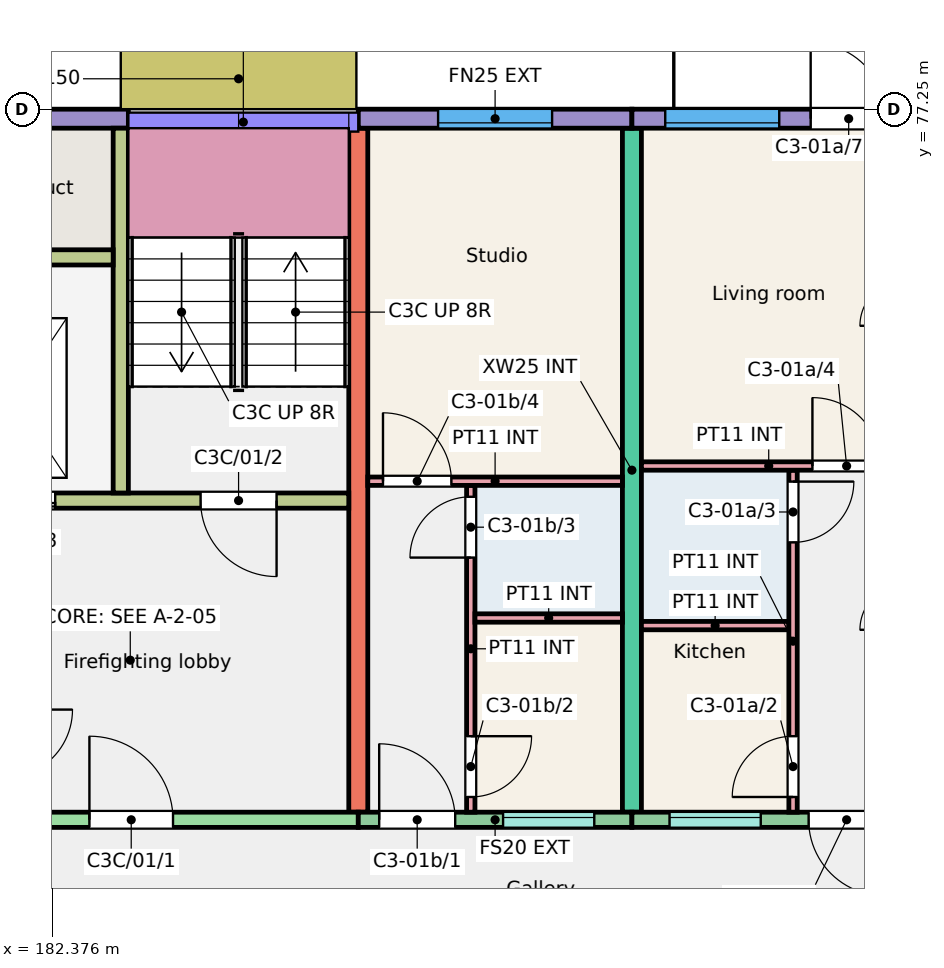
"""IFC4 building model, lengths in metres.
Left out: names, types, materials, properties, quantities, classifications, styles, units other than length and angle.
Written with IfcOpenShell. Run it as: python <this file> out.ifc"""

import sys

from ifc_helpers import new_model, si_unit, direction, frame, frame_2d, origin, place, context, subcontext, project, spatial, rectangle, extrude, element, fill, save


model = new_model("IFC4")
c1 = context("Model", 3, precision=1e-05, world=origin(), true_north=direction((0.0, 1.0)))
c2 = subcontext(c1, "Body", "Model", "MODEL_VIEW")
j1 = project(units=[si_unit("LENGTHUNIT", "METRE"), si_unit("PLANEANGLEUNIT", "RADIAN")], contexts=[c1])
p1 = place(None, origin())
s1 = spatial("IfcSite", under=j1, at=p1, CompositionType="ELEMENT")
p2 = place(p1, origin())
s2 = spatial("IfcBuilding", under=s1, at=p2, CompositionType="ELEMENT")
p3 = place(p2, frame((0.0, 0.0, 3.0)))
s3 = spatial("IfcBuildingStorey", under=s2, at=p3, CompositionType="ELEMENT", Elevation=3.0)
for number, where, z_axis, x_axis in (
    (1, (186.4, 68.0, 0.0), (0.0, 0.0, 1.0), (0.0, 1.0, 0.0)),
    (2, (190.0, 68.0, 0.0), (0.0, 0.0, 1.0), (0.0, 1.0, 0.0)),
):
    element("IfcWall", number, at=place(p3, frame(where, z_axis=z_axis, x_axis=x_axis)), inside=s3, PredefinedType="SHEAR", context=c2, shape_type="SweptSolid", body=[
        extrude(rectangle(XDim=9.0, YDim=0.25, at=frame_2d((4.5, 0.0))), origin(), (0.0, 0.0, 1.0), 3.0),
    ])
p4 = place(p3, frame((180.4, 77.125, 0.0), z_axis=(0.0, 0.0, 1.0), x_axis=(1.0, 0.0, 0.0)))
e3 = element("IfcWall", 3, at=p4, inside=s3, PredefinedType="SOLIDWALL", context=c2, shape_type="SweptSolid", body=[
    extrude(rectangle(XDim=2.975, YDim=0.25, at=frame_2d((1.488, 0.0))), origin(), (0.0, 0.0, 1.0), 3.0),
])
p5 = place(p3, frame((180.55, 67.9, 0.0), z_axis=(0.0, 0.0, 1.0), x_axis=(1.0, 0.0, 0.0)))
e4 = element("IfcWall", 4, at=p5, inside=s3, PredefinedType="SHEAR", context=c2, shape_type="SweptSolid", body=[
    extrude(rectangle(XDim=5.85, YDim=0.2, at=frame_2d((2.925, 0.0))), origin(), (0.0, 0.0, 1.0), 3.0),
])
p6 = place(p5, frame((2.312, 0.0, 0.0)))
e5 = element("IfcOpeningElement", 5, at=p6, cuts=e4, PredefinedType="OPENING", context=c2, shape_type="SweptSolid", body=[
    extrude(rectangle(XDim=1.1, YDim=2.1, at=frame_2d((0.55, 1.05))), frame((0.0, 0.11, 0.0), z_axis=(0.0, -1.0, 0.0), x_axis=(1.0, 0.0, 0.0)), (0.0, 0.0, 1.0), 0.22),
])
p7 = place(p3, frame((180.55, 72.1, 0.0), z_axis=(0.0, 0.0, 1.0), x_axis=(1.0, 0.0, 0.0)))
e6 = element("IfcWall", 6, at=p7, inside=s3, PredefinedType="SHEAR", context=c2, shape_type="SweptSolid", body=[
    extrude(rectangle(XDim=5.725, YDim=0.2, at=frame_2d((2.862, 0.0))), origin(), (0.0, 0.0, 1.0), 3.0),
])
p8 = place(p7, frame((3.775, 0.0, 0.0)))
e7 = element("IfcOpeningElement", 7, at=p8, cuts=e6, PredefinedType="OPENING", context=c2, shape_type="SweptSolid", body=[
    extrude(rectangle(XDim=1.0, YDim=2.1, at=frame_2d((0.5, 1.05))), frame((0.0, 0.11, 0.0), z_axis=(0.0, -1.0, 0.0), x_axis=(1.0, 0.0, 0.0)), (0.0, 0.0, 1.0), 0.22),
])
p9 = place(p7, frame((0.762, 0.0, 0.0)))
e8 = element("IfcOpeningElement", 8, at=p9, cuts=e6, PredefinedType="OPENING", context=c2, shape_type="SweptSolid", body=[
    extrude(rectangle(XDim=1.1, YDim=2.1, at=frame_2d((0.55, 1.05))), frame((0.0, 0.11, 0.0), z_axis=(0.0, -1.0, 0.0), x_axis=(1.0, 0.0, 0.0)), (0.0, 0.0, 1.0), 0.22),
])
p10 = place(p3, frame((183.275, 72.2, 0.0), z_axis=(0.0, 0.0, 1.0), x_axis=(0.0, 1.0, 0.0)))
e9 = element("IfcWall", 9, at=p10, inside=s3, PredefinedType="SHEAR", context=c2, shape_type="SweptSolid", body=[
    extrude(rectangle(XDim=4.8, YDim=0.2, at=frame_2d((2.4, 0.0))), origin(), (0.0, 0.0, 1.0), 3.0),
])
p11 = place(p3, frame((180.55, 75.3, 0.0), z_axis=(0.0, 0.0, 1.0), x_axis=(1.0, 0.0, 0.0)))
e10 = element("IfcWall", 10, at=p11, inside=s3, PredefinedType="SHEAR", context=c2, shape_type="SweptSolid", body=[
    extrude(rectangle(XDim=2.625, YDim=0.2, at=frame_2d((1.312, 0.0))), origin(), (0.0, 0.0, 1.0), 3.0),
])
p12 = place(p3, frame((186.4, 77.125, 0.0), z_axis=(0.0, 0.0, 1.0), x_axis=(1.0, 0.0, 0.0)))
e11 = element("IfcWall", 11, at=p12, inside=s3, PredefinedType="SOLIDWALL", context=c2, shape_type="SweptSolid", body=[
    extrude(rectangle(XDim=3.6, YDim=0.25, at=frame_2d((1.8, 0.0))), origin(), (0.0, 0.0, 1.0), 3.0),
])
p13 = place(p12, frame((1.05, 0.0, 0.9)))
e12 = element("IfcOpeningElement", 12, at=p13, cuts=e11, PredefinedType="OPENING", context=c2, shape_type="SweptSolid", body=[
    extrude(rectangle(XDim=1.5, YDim=1.5, at=frame_2d((0.75, 0.75))), frame((0.0, 0.135, 0.0), z_axis=(0.0, -1.0, 0.0), x_axis=(1.0, 0.0, 0.0)), (0.0, 0.0, 1.0), 0.27),
])
p14 = place(p3, frame((186.4, 67.9, 0.0), z_axis=(0.0, 0.0, 1.0), x_axis=(1.0, 0.0, 0.0)))
e13 = element("IfcWall", 13, at=p14, inside=s3, PredefinedType="SOLIDWALL", context=c2, shape_type="SweptSolid", body=[
    extrude(rectangle(XDim=3.6, YDim=0.2, at=frame_2d((1.8, 0.0))), origin(), (0.0, 0.0, 1.0), 3.0),
])
p15 = place(p14, frame((1.905, 0.0, 1.1)))
e14 = element("IfcOpeningElement", 14, at=p15, cuts=e13, PredefinedType="OPENING", context=c2, shape_type="SweptSolid", body=[
    extrude(rectangle(XDim=1.2, YDim=1.3, at=frame_2d((0.6, 0.65))), frame((0.0, 0.11, 0.0), z_axis=(0.0, -1.0, 0.0), x_axis=(1.0, 0.0, 0.0)), (0.0, 0.0, 1.0), 0.22),
])
p16 = place(p14, frame((0.275, 0.0, 0.0)))
e15 = element("IfcOpeningElement", 15, at=p16, cuts=e13, PredefinedType="OPENING", context=c2, shape_type="SweptSolid", body=[
    extrude(rectangle(XDim=1.0, YDim=2.1, at=frame_2d((0.5, 1.05))), frame((0.0, 0.11, 0.0), z_axis=(0.0, -1.0, 0.0), x_axis=(1.0, 0.0, 0.0)), (0.0, 0.0, 1.0), 0.22),
])
p17 = place(p3, frame((190.0, 77.125, 0.0), z_axis=(0.0, 0.0, 1.0), x_axis=(1.0, 0.0, 0.0)))
e16 = element("IfcWall", 16, at=p17, inside=s3, PredefinedType="SOLIDWALL", context=c2, shape_type="SweptSolid", body=[
    extrude(rectangle(XDim=3.6, YDim=0.25, at=frame_2d((1.8, 0.0))), origin(), (0.0, 0.0, 1.0), 3.0),
])
p18 = place(p17, frame((0.438, 0.0, 0.9)))
e17 = element("IfcOpeningElement", 17, at=p18, cuts=e16, PredefinedType="OPENING", context=c2, shape_type="SweptSolid", body=[
    extrude(rectangle(XDim=1.5, YDim=1.5, at=frame_2d((0.75, 0.75))), frame((0.0, 0.135, 0.0), z_axis=(0.0, -1.0, 0.0), x_axis=(1.0, 0.0, 0.0)), (0.0, 0.0, 1.0), 0.27),
])
p19 = place(p17, frame((2.352, 0.0, 0.0)))
e18 = element("IfcOpeningElement", 18, at=p19, cuts=e16, PredefinedType="OPENING", context=c2, shape_type="SweptSolid", body=[
    extrude(rectangle(XDim=1.0, YDim=2.1, at=frame_2d((0.5, 1.05))), frame((0.0, 0.135, 0.0), z_axis=(0.0, -1.0, 0.0), x_axis=(1.0, 0.0, 0.0)), (0.0, 0.0, 1.0), 0.27),
])
p20 = place(p3, frame((190.0, 67.9, 0.0), z_axis=(0.0, 0.0, 1.0), x_axis=(1.0, 0.0, 0.0)))
e19 = element("IfcWall", 19, at=p20, inside=s3, PredefinedType="SOLIDWALL", context=c2, shape_type="SweptSolid", body=[
    extrude(rectangle(XDim=3.6, YDim=0.2, at=frame_2d((1.8, 0.0))), origin(), (0.0, 0.0, 1.0), 3.0),
])
p21 = place(p20, frame((0.495, 0.0, 1.1)))
e20 = element("IfcOpeningElement", 20, at=p21, cuts=e19, PredefinedType="OPENING", context=c2, shape_type="SweptSolid", body=[
    extrude(rectangle(XDim=1.2, YDim=1.3, at=frame_2d((0.6, 0.65))), frame((0.0, 0.11, 0.0), z_axis=(0.0, -1.0, 0.0), x_axis=(1.0, 0.0, 0.0)), (0.0, 0.0, 1.0), 0.22),
])
p22 = place(p20, frame((2.325, 0.0, 0.0)))
e21 = element("IfcOpeningElement", 21, at=p22, cuts=e19, PredefinedType="OPENING", context=c2, shape_type="SweptSolid", body=[
    extrude(rectangle(XDim=1.0, YDim=2.1, at=frame_2d((0.5, 1.05))), frame((0.0, 0.11, 0.0), z_axis=(0.0, -1.0, 0.0), x_axis=(1.0, 0.0, 0.0)), (0.0, 0.0, 1.0), 0.22),
])
p23 = place(p3, frame((190.125, 70.455, 0.0), z_axis=(0.0, 0.0, 1.0), x_axis=(1.0, 0.0, 0.0)))
e22 = element("IfcWall", 22, at=p23, inside=s3, PredefinedType="PARTITIONING", context=c2, shape_type="SweptSolid", body=[
    extrude(rectangle(XDim=1.94, YDim=0.11, at=frame_2d((0.97, 0.0))), origin(), (0.0, 0.0, 1.0), 2.8),
])
p24 = place(p3, frame((192.12, 68.0, 0.0), z_axis=(0.0, 0.0, 1.0), x_axis=(0.0, 1.0, 0.0)))
e23 = element("IfcWall", 23, at=p24, inside=s3, PredefinedType="PARTITIONING", context=c2, shape_type="SweptSolid", body=[
    extrude(rectangle(XDim=4.5, YDim=0.11, at=frame_2d((2.25, 0.0))), origin(), (0.0, 0.0, 1.0), 2.8),
])
p25 = place(p24, frame((0.2, 0.0, 0.0)))
e24 = element("IfcOpeningElement", 24, at=p25, cuts=e23, PredefinedType="OPENING", context=c2, shape_type="SweptSolid", body=[
    extrude(rectangle(XDim=0.8, YDim=2.1, at=frame_2d((0.4, 1.05))), frame((0.0, 0.065, 0.0), z_axis=(0.0, -1.0, 0.0), x_axis=(1.0, 0.0, 0.0)), (0.0, 0.0, 1.0), 0.13),
])
p26 = place(p24, frame((3.55, 0.0, 0.0)))
e25 = element("IfcOpeningElement", 25, at=p26, cuts=e23, PredefinedType="OPENING", context=c2, shape_type="SweptSolid", body=[
    extrude(rectangle(XDim=0.8, YDim=2.1, at=frame_2d((0.4, 1.05))), frame((0.0, 0.065, 0.0), z_axis=(0.0, -1.0, 0.0), x_axis=(1.0, 0.0, 0.0)), (0.0, 0.0, 1.0), 0.13),
])
p27 = place(p3, frame((190.125, 72.555, 0.0), z_axis=(0.0, 0.0, 1.0), x_axis=(1.0, 0.0, 0.0)))
e26 = element("IfcWall", 26, at=p27, inside=s3, PredefinedType="PARTITIONING", context=c2, shape_type="SweptSolid", body=[
    extrude(rectangle(XDim=3.35, YDim=0.11, at=frame_2d((1.675, 0.0))), origin(), (0.0, 0.0, 1.0), 2.8),
])
p28 = place(p27, frame((2.25, 0.0, 0.0)))
e27 = element("IfcOpeningElement", 27, at=p28, cuts=e26, PredefinedType="OPENING", context=c2, shape_type="SweptSolid", body=[
    extrude(rectangle(XDim=0.9, YDim=2.1, at=frame_2d((0.45, 1.05))), frame((0.0, 0.065, 0.0), z_axis=(0.0, -1.0, 0.0), x_axis=(1.0, 0.0, 0.0)), (0.0, 0.0, 1.0), 0.13),
])
p29 = place(p3, frame((187.88, 68.0, 0.0), z_axis=(0.0, 0.0, 1.0), x_axis=(0.0, 1.0, 0.0)))
e28 = element("IfcWall", 28, at=p29, inside=s3, PredefinedType="PARTITIONING", context=c2, shape_type="SweptSolid", body=[
    extrude(rectangle(XDim=4.3, YDim=0.11, at=frame_2d((2.15, 0.0))), origin(), (0.0, 0.0, 1.0), 2.8),
])
p30 = place(p29, frame((0.2, 0.0, 0.0)))
e29 = element("IfcOpeningElement", 29, at=p30, cuts=e28, PredefinedType="OPENING", context=c2, shape_type="SweptSolid", body=[
    extrude(rectangle(XDim=0.8, YDim=2.1, at=frame_2d((0.4, 1.05))), frame((0.0, 0.065, 0.0), z_axis=(0.0, -1.0, 0.0), x_axis=(1.0, 0.0, 0.0)), (0.0, 0.0, 1.0), 0.13),
])
p31 = place(p29, frame((3.35, 0.0, 0.0)))
e30 = element("IfcOpeningElement", 30, at=p31, cuts=e28, PredefinedType="OPENING", context=c2, shape_type="SweptSolid", body=[
    extrude(rectangle(XDim=0.8, YDim=2.1, at=frame_2d((0.4, 1.05))), frame((0.0, 0.065, 0.0), z_axis=(0.0, -1.0, 0.0), x_axis=(1.0, 0.0, 0.0)), (0.0, 0.0, 1.0), 0.13),
])
p32 = place(p3, frame((187.935, 70.555, 0.0), z_axis=(0.0, 0.0, 1.0), x_axis=(1.0, 0.0, 0.0)))
e31 = element("IfcWall", 31, at=p32, inside=s3, PredefinedType="PARTITIONING", context=c2, shape_type="SweptSolid", body=[
    extrude(rectangle(XDim=1.94, YDim=0.11, at=frame_2d((0.97, 0.0))), origin(), (0.0, 0.0, 1.0), 2.8),
])
p33 = place(p3, frame((186.525, 72.355, 0.0), z_axis=(0.0, 0.0, 1.0), x_axis=(1.0, 0.0, 0.0)))
e32 = element("IfcWall", 32, at=p33, inside=s3, PredefinedType="PARTITIONING", context=c2, shape_type="SweptSolid", body=[
    extrude(rectangle(XDim=3.35, YDim=0.11, at=frame_2d((1.675, 0.0))), origin(), (0.0, 0.0, 1.0), 2.8),
])
p34 = place(p33, frame((0.2, 0.0, 0.0)))
e33 = element("IfcOpeningElement", 33, at=p34, cuts=e32, PredefinedType="OPENING", context=c2, shape_type="SweptSolid", body=[
    extrude(rectangle(XDim=0.9, YDim=2.1, at=frame_2d((0.45, 1.05))), frame((0.0, 0.065, 0.0), z_axis=(0.0, -1.0, 0.0), x_axis=(1.0, 0.0, 0.0)), (0.0, 0.0, 1.0), 0.13),
])
p35 = place(p21, origin())
e34 = element("IfcWindow", 34, at=p35, inside=s3, PartitioningType="SINGLE_PANEL", PredefinedType="WINDOW", context=c2, shape_type="SweptSolid", body=[
    extrude(rectangle(XDim=1.2, YDim=1.3, at=frame_2d((0.6, 0.65))), frame((0.0, 0.06, 0.0), z_axis=(0.0, -1.0, 0.0), x_axis=(1.0, 0.0, 0.0)), (0.0, 0.0, 1.0), 0.06),
])
fill(e20, e34)
p36 = place(p18, origin())
e35 = element("IfcWindow", 35, at=p36, inside=s3, PartitioningType="SINGLE_PANEL", PredefinedType="WINDOW", context=c2, shape_type="SweptSolid", body=[
    extrude(rectangle(XDim=1.5, YDim=1.5, at=frame_2d((0.75, 0.75))), frame((0.0, -0.025, 0.0), z_axis=(0.0, -1.0, 0.0), x_axis=(1.0, 0.0, 0.0)), (0.0, 0.0, 1.0), 0.06),
])
fill(e17, e35)
p37 = place(p15, origin())
e36 = element("IfcWindow", 36, at=p37, inside=s3, PartitioningType="SINGLE_PANEL", PredefinedType="WINDOW", context=c2, shape_type="SweptSolid", body=[
    extrude(rectangle(XDim=1.2, YDim=1.3, at=frame_2d((0.6, 0.65))), frame((0.0, 0.06, 0.0), z_axis=(0.0, -1.0, 0.0), x_axis=(1.0, 0.0, 0.0)), (0.0, 0.0, 1.0), 0.06),
])
fill(e14, e36)
p38 = place(p13, origin())
e37 = element("IfcWindow", 37, at=p38, inside=s3, PartitioningType="SINGLE_PANEL", PredefinedType="WINDOW", context=c2, shape_type="SweptSolid", body=[
    extrude(rectangle(XDim=1.5, YDim=1.5, at=frame_2d((0.75, 0.75))), frame((0.0, -0.025, 0.0), z_axis=(0.0, -1.0, 0.0), x_axis=(1.0, 0.0, 0.0)), (0.0, 0.0, 1.0), 0.06),
])
fill(e12, e37)
p39 = place(p22, origin())
e38 = element("IfcDoor", 38, at=p39, inside=s3, OperationType="SINGLE_SWING_RIGHT", PredefinedType="DOOR", context=c2, shape_type="SweptSolid", body=[
    extrude(rectangle(XDim=1.0, YDim=2.1, at=frame_2d((0.5, 1.05))), frame((0.0, 0.025, 0.0), z_axis=(0.0, -1.0, 0.0), x_axis=(1.0, 0.0, 0.0)), (0.0, 0.0, 1.0), 0.05),
])
fill(e21, e38)
p40 = place(p25, origin())
e39 = element("IfcDoor", 39, at=p40, inside=s3, OperationType="SINGLE_SWING_LEFT", PredefinedType="DOOR", context=c2, shape_type="SweptSolid", body=[
    extrude(rectangle(XDim=0.8, YDim=2.1, at=frame_2d((0.4, 1.05))), frame((0.0, 0.025, 0.0), z_axis=(0.0, -1.0, 0.0), x_axis=(1.0, 0.0, 0.0)), (0.0, 0.0, 1.0), 0.05),
])
fill(e24, e39)
p41 = place(p26, origin())
e40 = element("IfcDoor", 40, at=p41, inside=s3, OperationType="SINGLE_SWING_RIGHT", PredefinedType="DOOR", context=c2, shape_type="SweptSolid", body=[
    extrude(rectangle(XDim=0.8, YDim=2.1, at=frame_2d((0.4, 1.05))), frame((0.0, 0.025, 0.0), z_axis=(0.0, -1.0, 0.0), x_axis=(1.0, 0.0, 0.0)), (0.0, 0.0, 1.0), 0.05),
])
fill(e25, e40)
p42 = place(p28, origin())
e41 = element("IfcDoor", 41, at=p42, inside=s3, OperationType="SINGLE_SWING_LEFT", PredefinedType="DOOR", context=c2, shape_type="SweptSolid", body=[
    extrude(rectangle(XDim=0.9, YDim=2.1, at=frame_2d((0.45, 1.05))), frame((0.0, 0.025, 0.0), z_axis=(0.0, -1.0, 0.0), x_axis=(1.0, 0.0, 0.0)), (0.0, 0.0, 1.0), 0.05),
])
fill(e27, e41)
p43 = place(p19, origin())
e42 = element("IfcDoor", 42, at=p43, inside=s3, OperationType="SINGLE_SWING_LEFT", PredefinedType="DOOR", context=c2, shape_type="SweptSolid", body=[
    extrude(rectangle(XDim=1.0, YDim=2.1, at=frame_2d((0.5, 1.05))), frame((0.0, 0.025, 0.0), z_axis=(0.0, -1.0, 0.0), x_axis=(1.0, 0.0, 0.0)), (0.0, 0.0, 1.0), 0.05),
])
fill(e18, e42)
p44 = place(p16, origin())
e43 = element("IfcDoor", 43, at=p44, inside=s3, OperationType="SINGLE_SWING_LEFT", PredefinedType="DOOR", context=c2, shape_type="SweptSolid", body=[
    extrude(rectangle(XDim=1.0, YDim=2.1, at=frame_2d((0.5, 1.05))), frame((0.0, 0.025, 0.0), z_axis=(0.0, -1.0, 0.0), x_axis=(1.0, 0.0, 0.0)), (0.0, 0.0, 1.0), 0.05),
])
fill(e15, e43)
p45 = place(p30, origin())
e44 = element("IfcDoor", 44, at=p45, inside=s3, OperationType="SINGLE_SWING_RIGHT", PredefinedType="DOOR", context=c2, shape_type="SweptSolid", body=[
    extrude(rectangle(XDim=0.8, YDim=2.1, at=frame_2d((0.4, 1.05))), frame((0.0, 0.025, 0.0), z_axis=(0.0, -1.0, 0.0), x_axis=(1.0, 0.0, 0.0)), (0.0, 0.0, 1.0), 0.05),
])
fill(e29, e44)
p46 = place(p31, origin())
e45 = element("IfcDoor", 45, at=p46, inside=s3, OperationType="SINGLE_SWING_LEFT", PredefinedType="DOOR", context=c2, shape_type="SweptSolid", body=[
    extrude(rectangle(XDim=0.8, YDim=2.1, at=frame_2d((0.4, 1.05))), frame((0.0, 0.025, 0.0), z_axis=(0.0, -1.0, 0.0), x_axis=(1.0, 0.0, 0.0)), (0.0, 0.0, 1.0), 0.05),
])
fill(e30, e45)
p47 = place(p34, origin())
e46 = element("IfcDoor", 46, at=p47, inside=s3, OperationType="SINGLE_SWING_LEFT", PredefinedType="DOOR", context=c2, shape_type="SweptSolid", body=[
    extrude(rectangle(XDim=0.9, YDim=2.1, at=frame_2d((0.45, 1.05))), frame((0.0, 0.025, 0.0), z_axis=(0.0, -1.0, 0.0), x_axis=(1.0, 0.0, 0.0)), (0.0, 0.0, 1.0), 0.05),
])
fill(e33, e46)
p48 = place(p6, origin())
e47 = element("IfcDoor", 47, at=p48, inside=s3, OperationType="SINGLE_SWING_LEFT", PredefinedType="DOOR", context=c2, shape_type="SweptSolid", body=[
    extrude(rectangle(XDim=1.1, YDim=2.1, at=frame_2d((0.55, 1.05))), frame((0.0, 0.025, 0.0), z_axis=(0.0, -1.0, 0.0), x_axis=(1.0, 0.0, 0.0)), (0.0, 0.0, 1.0), 0.05),
])
fill(e5, e47)
p49 = place(p8, origin())
e48 = element("IfcDoor", 48, at=p49, inside=s3, OperationType="SINGLE_SWING_RIGHT", PredefinedType="DOOR", context=c2, shape_type="SweptSolid", body=[
    extrude(rectangle(XDim=1.0, YDim=2.1, at=frame_2d((0.5, 1.05))), frame((0.0, 0.025, 0.0), z_axis=(0.0, -1.0, 0.0), x_axis=(1.0, 0.0, 0.0)), (0.0, 0.0, 1.0), 0.05),
])
fill(e7, e48)
p50 = place(p9, origin())
e49 = element("IfcDoor", 49, at=p50, inside=s3, OperationType="DOUBLE_DOOR_SLIDING", PredefinedType="DOOR", context=c2, shape_type="SweptSolid", body=[
    extrude(rectangle(XDim=1.1, YDim=2.1, at=frame_2d((0.55, 1.05))), frame((0.0, 0.025, 0.0), z_axis=(0.0, -1.0, 0.0), x_axis=(1.0, 0.0, 0.0)), (0.0, 0.0, 1.0), 0.05),
])
fill(e8, e49)
save(model, sys.argv[1])
